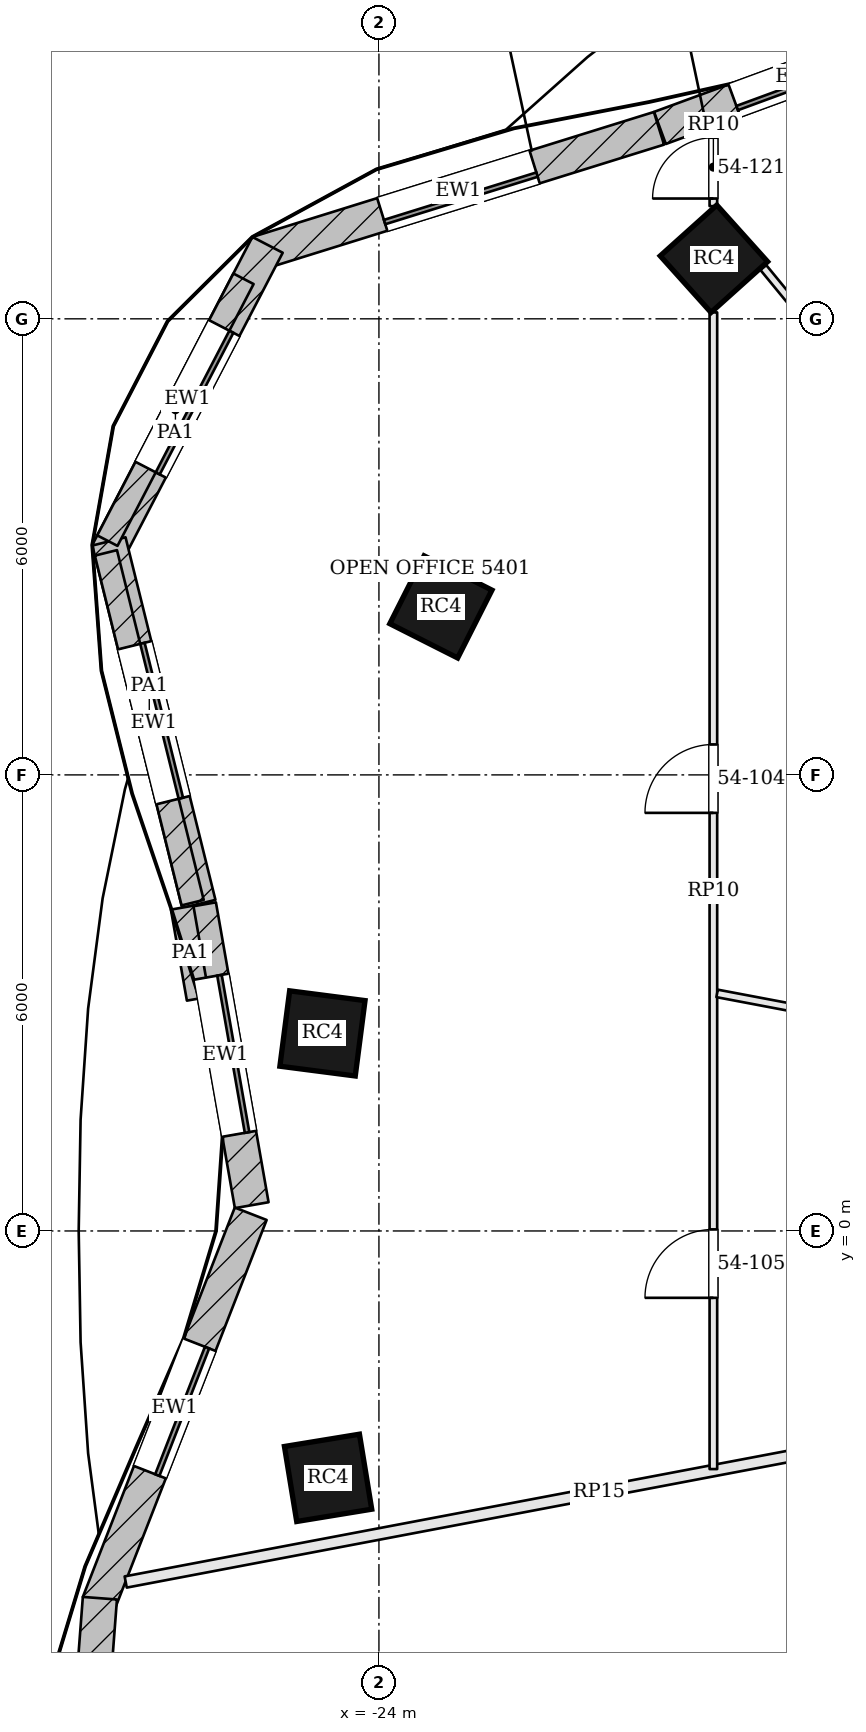
"""IFC4 building model, lengths in metres.
Left out: names, types, materials, properties, quantities, classifications, styles, units other than length and angle.
Written with IfcOpenShell. Run it as: python <this file> out.ifc"""

import sys

from ifc_helpers import new_model, si_unit, direction, frame, frame_2d, origin, origin_2d, place, context, subcontext, project, spatial, rectangle, extrude, element, fill, save


model = new_model("IFC4")
c1 = context("Model", 3, precision=1e-05, world=origin(), true_north=direction((0.0, 1.0)))
c2 = subcontext(c1, "Body", "Model", "MODEL_VIEW")
j1 = project(units=[si_unit("LENGTHUNIT", "METRE"), si_unit("PLANEANGLEUNIT", "RADIAN")], contexts=[c1])
p1 = place(None, origin())
s1 = spatial("IfcSite", under=j1, at=p1, CompositionType="ELEMENT")
p2 = place(p1, origin())
s2 = spatial("IfcBuilding", under=s1, at=p2, CompositionType="ELEMENT")
p3 = place(p2, frame((0.0, 0.0, 221.4)))
s3 = spatial("IfcBuildingStorey", under=s2, at=p3, CompositionType="ELEMENT", Elevation=221.4)
for number, where, z_axis, x_axis in (
    (1, (-19.593, 12.79, 0.0), (0.0, 0.0, 1.0), (-0.744, -0.668, 0.0)),
    (2, (-23.185, 8.21, 0.0), (0.0, 0.0, 1.0), (-0.451, -0.893, 0.0)),
    (3, (-24.743, 2.599, 0.0), (0.0, 0.0, 1.0), (-0.128, -0.992, 0.0)),
    (4, (-24.669, -3.248, 0.0), (0.0, 0.0, 1.0), (0.162, -0.987, 0.0)),
):
    element("IfcColumn", number, at=place(p3, frame(where, z_axis=z_axis, x_axis=x_axis)), inside=s3, PredefinedType="COLUMN", context=c2, shape_type="SweptSolid", body=[
        extrude(rectangle(XDim=1.0, YDim=1.0, at=origin_2d()), origin(), (0.0, 0.0, 1.0), 3.9),
    ])
p4 = place(p3, frame((-16.654, 15.852, 0.0), z_axis=(0.0, 0.0, 1.0), x_axis=(-0.938636568132, -0.344907803572, 0.0)))
e5 = element("IfcWall", 5, at=p4, inside=s3, PredefinedType="SOLIDWALL", context=c2, shape_type="SweptSolid", body=[
    extrude(rectangle(XDim=3.887, YDim=0.45, at=frame_2d((1.944, 0.0))), origin(), (0.0, 0.0, 1.0), 3.7),
])
p5 = place(p4, frame((1.044, 0.0, 0.9)))
e6 = element("IfcOpeningElement", 6, at=p5, cuts=e5, PredefinedType="OPENING", context=c2, shape_type="SweptSolid", body=[
    extrude(rectangle(XDim=1.8, YDim=2.3, at=frame_2d((0.9, 1.15))), frame((0.0, 0.235, 0.0), z_axis=(0.0, -1.0, 0.0), x_axis=(1.0, 0.0, 0.0)), (0.0, 0.0, 1.0), 0.47),
])
p6 = place(p3, frame((-20.316, 14.507, 0.0), z_axis=(0.0, 0.0, 1.0), x_axis=(-0.954807195185, -0.297225873743, 0.0)))
e7 = element("IfcWall", 7, at=p6, inside=s3, PredefinedType="SOLIDWALL", context=c2, shape_type="SweptSolid", body=[
    extrude(rectangle(XDim=5.526, YDim=0.45, at=frame_2d((2.763, 0.0))), origin(), (0.0, 0.0, 1.0), 3.7),
])
p7 = place(p6, frame((1.713, 0.0, 0.9)))
e8 = element("IfcOpeningElement", 8, at=p7, cuts=e7, PredefinedType="OPENING", context=c2, shape_type="SweptSolid", body=[
    extrude(rectangle(XDim=2.1, YDim=2.3, at=frame_2d((1.05, 1.15))), frame((0.0, 0.235, 0.0), z_axis=(0.0, -1.0, 0.0), x_axis=(1.0, 0.0, 0.0)), (0.0, 0.0, 1.0), 0.47),
])
p8 = place(p3, frame((-25.465, 12.973, 0.0), z_axis=(0.0, 0.0, 1.0), x_axis=(-0.461288789222, -0.887250050965, 0.0)))
e9 = element("IfcWall", 9, at=p8, inside=s3, PredefinedType="SOLIDWALL", context=c2, shape_type="SweptSolid", body=[
    extrude(rectangle(XDim=4.568, YDim=0.45, at=frame_2d((2.284, 0.0))), origin(), (0.0, 0.0, 1.0), 3.7),
])
p9 = place(p8, frame((1.234, 0.0, 0.9)))
e10 = element("IfcOpeningElement", 10, at=p9, cuts=e9, PredefinedType="OPENING", context=c2, shape_type="SweptSolid", body=[
    extrude(rectangle(XDim=2.1, YDim=2.3, at=frame_2d((1.05, 1.15))), frame((0.0, 0.235, 0.0), z_axis=(0.0, -1.0, 0.0), x_axis=(1.0, 0.0, 0.0)), (0.0, 0.0, 1.0), 0.47),
])
p10 = place(p3, frame((-27.552, 9.072, 0.0), z_axis=(0.0, 0.0, 1.0), x_axis=(0.240629941406, -0.970616933347, 0.0)))
e11 = element("IfcWall", 11, at=p10, inside=s3, PredefinedType="SOLIDWALL", context=c2, shape_type="SweptSolid", body=[
    extrude(rectangle(XDim=4.915, YDim=0.45, at=frame_2d((2.457, 0.0))), origin(), (0.0, 0.0, 1.0), 3.7),
])
p11 = place(p10, frame((1.407, 0.0, 0.9)))
e12 = element("IfcOpeningElement", 12, at=p11, cuts=e11, PredefinedType="OPENING", context=c2, shape_type="SweptSolid", body=[
    extrude(rectangle(XDim=2.1, YDim=2.3, at=frame_2d((1.05, 1.15))), frame((0.0, 0.235, 0.0), z_axis=(0.0, -1.0, 0.0), x_axis=(1.0, 0.0, 0.0)), (0.0, 0.0, 1.0), 0.47),
])
p12 = place(p3, frame((-26.366, 4.285, 0.0), z_axis=(0.0, 0.0, 1.0), x_axis=(0.172902168926, -0.984939003178, 0.0)))
e13 = element("IfcWall", 13, at=p12, inside=s3, PredefinedType="SOLIDWALL", context=c2, shape_type="SweptSolid", body=[
    extrude(rectangle(XDim=4.006, YDim=0.45, at=frame_2d((2.003, 0.0))), origin(), (0.0, 0.0, 1.0), 3.7),
])
p13 = place(p12, frame((0.953, 0.0, 0.9)))
e14 = element("IfcOpeningElement", 14, at=p13, cuts=e13, PredefinedType="OPENING", context=c2, shape_type="SweptSolid", body=[
    extrude(rectangle(XDim=2.1, YDim=2.3, at=frame_2d((1.05, 1.15))), frame((0.0, 0.235, 0.0), z_axis=(0.0, -1.0, 0.0), x_axis=(1.0, 0.0, 0.0)), (0.0, 0.0, 1.0), 0.47),
])
p14 = place(p3, frame((-25.687, 0.226, 0.0), z_axis=(0.0, 0.0, 1.0), x_axis=(-0.363500194409, -0.931594122279, 0.0)))
e15 = element("IfcWall", 15, at=p14, inside=s3, PredefinedType="SOLIDWALL", context=c2, shape_type="SweptSolid", body=[
    extrude(rectangle(XDim=5.499, YDim=0.45, at=frame_2d((2.75, 0.0))), origin(), (0.0, 0.0, 1.0), 3.7),
])
p15 = place(p14, frame((1.849, 0.0, 0.9)))
e16 = element("IfcOpeningElement", 16, at=p15, cuts=e15, PredefinedType="OPENING", context=c2, shape_type="SweptSolid", body=[
    extrude(rectangle(XDim=1.8, YDim=2.3, at=frame_2d((0.9, 1.15))), frame((0.0, 0.235, 0.0), z_axis=(0.0, -1.0, 0.0), x_axis=(1.0, 0.0, 0.0)), (0.0, 0.0, 1.0), 0.47),
])
p16 = place(p3, frame((-27.671, -4.831, 0.0), z_axis=(0.0, 0.0, 1.0), x_axis=(-0.075658122047, -0.997133816781, 0.0)))
e17 = element("IfcWall", 17, at=p16, inside=s3, PredefinedType="SOLIDWALL", context=c2, shape_type="SweptSolid", body=[
    extrude(rectangle(XDim=4.369, YDim=0.45, at=frame_2d((2.185, 0.0))), origin(), (0.0, 0.0, 1.0), 3.7),
])
p17 = place(p16, frame((1.135, 0.0, 0.9)))
e18 = element("IfcOpeningElement", 18, at=p17, cuts=e17, PredefinedType="OPENING", context=c2, shape_type="SweptSolid", body=[
    extrude(rectangle(XDim=2.1, YDim=2.3, at=frame_2d((1.05, 1.15))), frame((0.0, 0.235, 0.0), z_axis=(0.0, -1.0, 0.0), x_axis=(1.0, 0.0, 0.0)), (0.0, 0.0, 1.0), 0.47),
])
p18 = place(p3, frame((-25.782, 12.527, 3.9), z_axis=(0.0, 0.0, 1.0), x_axis=(-0.461218103562, -0.88728679746, 0.0)))
e19 = element("IfcWall", 19, at=p18, inside=s3, PredefinedType="PARAPET", context=c2, shape_type="SweptSolid", body=[
    extrude(rectangle(XDim=3.883, YDim=0.3, at=frame_2d((1.941, 0.0))), origin(), (0.0, 0.0, 1.0), 1.1),
])
p19 = place(p3, frame((-27.592, 8.921, 3.9), z_axis=(0.0, 0.0, 1.0), x_axis=(0.240669381496, -0.970607154729, 0.0)))
e20 = element("IfcWall", 20, at=p19, inside=s3, PredefinedType="PARAPET", context=c2, shape_type="SweptSolid", body=[
    extrude(rectangle(XDim=4.741, YDim=0.3, at=frame_2d((2.371, 0.0))), origin(), (0.0, 0.0, 1.0), 1.1),
])
p20 = place(p3, frame((-26.589, 4.254, 3.9), z_axis=(0.0, 0.0, 1.0), x_axis=(0.172857566704, -0.984946831881, 0.0)))
e21 = element("IfcWall", 21, at=p20, inside=s3, PredefinedType="PARAPET", context=c2, shape_type="SweptSolid", body=[
    extrude(rectangle(XDim=1.216, YDim=0.3, at=frame_2d((0.608, 0.0))), origin(), (0.0, 0.0, 1.0), 1.1),
])
p21 = place(p3, frame((-27.332, -4.618, 0.0), z_axis=(0.0, 0.0, 1.0), x_axis=(0.982506027703, 0.186230785661, 0.0)))
e22 = element("IfcWall", 22, at=p21, inside=s3, PredefinedType="PARTITIONING", context=c2, shape_type="SweptSolid", body=[
    extrude(rectangle(XDim=12.68, YDim=0.15, at=frame_2d((6.34, 0.0))), origin(), (0.0, 0.0, 1.0), 3.234),
])
p22 = place(p3, frame((-19.6, -3.133, 0.0), z_axis=(0.0, 0.0, 1.0), x_axis=(0.0, 1.0, 0.0)))
e23 = element("IfcWall", 23, at=p22, inside=s3, PredefinedType="PARTITIONING", context=c2, shape_type="SweptSolid", body=[
    extrude(rectangle(XDim=15.217, YDim=0.1, at=frame_2d((7.609, 0.0))), origin(), (0.0, 0.0, 1.0), 3.084),
])
p23 = place(p22, frame((8.633, 0.0, 0.0)))
e24 = element("IfcOpeningElement", 24, at=p23, cuts=e23, PredefinedType="OPENING", context=c2, shape_type="SweptSolid", body=[
    extrude(rectangle(XDim=0.9, YDim=2.1, at=frame_2d((0.45, 1.05))), frame((0.0, 0.06, 0.0), z_axis=(0.0, -1.0, 0.0), x_axis=(1.0, 0.0, 0.0)), (0.0, 0.0, 1.0), 0.12),
])
p24 = place(p22, frame((2.253, 0.0, 0.0)))
e25 = element("IfcOpeningElement", 25, at=p24, cuts=e23, PredefinedType="OPENING", context=c2, shape_type="SweptSolid", body=[
    extrude(rectangle(XDim=0.9, YDim=2.1, at=frame_2d((0.45, 1.05))), frame((0.0, 0.06, 0.0), z_axis=(0.0, -1.0, 0.0), x_axis=(1.0, 0.0, 0.0)), (0.0, 0.0, 1.0), 0.12),
])
p25 = place(p3, frame((-19.6, 13.483, 0.0), z_axis=(0.0, 0.0, 1.0), x_axis=(0.0, 1.0, 0.0)))
e26 = element("IfcWall", 26, at=p25, inside=s3, PredefinedType="PARTITIONING", context=c2, shape_type="SweptSolid", body=[
    extrude(rectangle(XDim=1.026, YDim=0.1, at=frame_2d((0.513, 0.0))), origin(), (0.0, 0.0, 1.0), 3.084),
])
p26 = place(p25, frame((0.1, 0.0, 0.0)))
e27 = element("IfcOpeningElement", 27, at=p26, cuts=e26, PredefinedType="OPENING", context=c2, shape_type="SweptSolid", body=[
    extrude(rectangle(XDim=0.8, YDim=2.1, at=frame_2d((0.4, 1.05))), frame((0.0, 0.06, 0.0), z_axis=(0.0, -1.0, 0.0), x_axis=(1.0, 0.0, 0.0)), (0.0, 0.0, 1.0), 0.12),
])
p27 = place(p3, frame((-14.848, 7.689, 0.0), z_axis=(0.0, 0.0, 1.0), x_axis=(-0.63471602348, 0.772745475262, 0.0)))
e28 = element("IfcWall", 28, at=p27, inside=s3, PredefinedType="PARTITIONING", context=c2, shape_type="SweptSolid", body=[
    extrude(rectangle(XDim=6.452, YDim=0.1, at=frame_2d((3.226, 0.0))), origin(), (0.0, 0.0, 1.0), 3.084),
])
p28 = place(p3, frame((-14.874, 2.239, 0.0), z_axis=(0.0, 0.0, 1.0), x_axis=(-0.982526163868, 0.186124520994, 0.0)))
e29 = element("IfcWall", 29, at=p28, inside=s3, PredefinedType="PARTITIONING", context=c2, shape_type="SweptSolid", body=[
    extrude(rectangle(XDim=4.76, YDim=0.1, at=frame_2d((2.38, 0.0))), origin(), (0.0, 0.0, 1.0), 3.084),
])
p29 = place(p5, origin())
e30 = element("IfcWindow", 30, at=p29, inside=s3, PartitioningType="SINGLE_PANEL", PredefinedType="WINDOW", context=c2, shape_type="SweptSolid", body=[
    extrude(rectangle(XDim=1.8, YDim=2.3, at=frame_2d((0.9, 1.15))), frame((0.0, 0.135, 0.0), z_axis=(0.0, -1.0, 0.0), x_axis=(1.0, 0.0, 0.0)), (0.0, 0.0, 1.0), 0.06),
])
fill(e6, e30)
p30 = place(p7, origin())
e31 = element("IfcWindow", 31, at=p30, inside=s3, PartitioningType="SINGLE_PANEL", PredefinedType="WINDOW", context=c2, shape_type="SweptSolid", body=[
    extrude(rectangle(XDim=2.1, YDim=2.3, at=frame_2d((1.05, 1.15))), frame((0.0, 0.135, 0.0), z_axis=(0.0, -1.0, 0.0), x_axis=(1.0, 0.0, 0.0)), (0.0, 0.0, 1.0), 0.06),
])
fill(e8, e31)
p31 = place(p9, origin())
e32 = element("IfcWindow", 32, at=p31, inside=s3, PartitioningType="SINGLE_PANEL", PredefinedType="WINDOW", context=c2, shape_type="SweptSolid", body=[
    extrude(rectangle(XDim=2.1, YDim=2.3, at=frame_2d((1.05, 1.15))), frame((0.0, 0.135, 0.0), z_axis=(0.0, -1.0, 0.0), x_axis=(1.0, 0.0, 0.0)), (0.0, 0.0, 1.0), 0.06),
])
fill(e10, e32)
p32 = place(p11, origin())
e33 = element("IfcWindow", 33, at=p32, inside=s3, PartitioningType="SINGLE_PANEL", PredefinedType="WINDOW", context=c2, shape_type="SweptSolid", body=[
    extrude(rectangle(XDim=2.1, YDim=2.3, at=frame_2d((1.05, 1.15))), frame((0.0, 0.135, 0.0), z_axis=(0.0, -1.0, 0.0), x_axis=(1.0, 0.0, 0.0)), (0.0, 0.0, 1.0), 0.06),
])
fill(e12, e33)
p33 = place(p13, origin())
e34 = element("IfcWindow", 34, at=p33, inside=s3, PartitioningType="SINGLE_PANEL", PredefinedType="WINDOW", context=c2, shape_type="SweptSolid", body=[
    extrude(rectangle(XDim=2.1, YDim=2.3, at=frame_2d((1.05, 1.15))), frame((0.0, 0.135, 0.0), z_axis=(0.0, -1.0, 0.0), x_axis=(1.0, 0.0, 0.0)), (0.0, 0.0, 1.0), 0.06),
])
fill(e14, e34)
p34 = place(p15, origin())
e35 = element("IfcWindow", 35, at=p34, inside=s3, PartitioningType="SINGLE_PANEL", PredefinedType="WINDOW", context=c2, shape_type="SweptSolid", body=[
    extrude(rectangle(XDim=1.8, YDim=2.3, at=frame_2d((0.9, 1.15))), frame((0.0, 0.135, 0.0), z_axis=(0.0, -1.0, 0.0), x_axis=(1.0, 0.0, 0.0)), (0.0, 0.0, 1.0), 0.06),
])
fill(e16, e35)
p35 = place(p23, origin())
e36 = element("IfcDoor", 36, at=p35, inside=s3, OperationType="SINGLE_SWING_LEFT", PredefinedType="DOOR", context=c2, shape_type="SweptSolid", body=[
    extrude(rectangle(XDim=0.9, YDim=2.1, at=frame_2d((0.45, 1.05))), frame((0.0, 0.025, 0.0), z_axis=(0.0, -1.0, 0.0), x_axis=(1.0, 0.0, 0.0)), (0.0, 0.0, 1.0), 0.05),
])
fill(e24, e36)
p36 = place(p24, origin())
e37 = element("IfcDoor", 37, at=p36, inside=s3, OperationType="SINGLE_SWING_LEFT", PredefinedType="DOOR", context=c2, shape_type="SweptSolid", body=[
    extrude(rectangle(XDim=0.9, YDim=2.1, at=frame_2d((0.45, 1.05))), frame((0.0, 0.025, 0.0), z_axis=(0.0, -1.0, 0.0), x_axis=(1.0, 0.0, 0.0)), (0.0, 0.0, 1.0), 0.05),
])
fill(e25, e37)
p37 = place(p26, origin())
e38 = element("IfcDoor", 38, at=p37, inside=s3, OperationType="SINGLE_SWING_LEFT", PredefinedType="DOOR", context=c2, shape_type="SweptSolid", body=[
    extrude(rectangle(XDim=0.8, YDim=2.1, at=frame_2d((0.4, 1.05))), frame((0.0, 0.025, 0.0), z_axis=(0.0, -1.0, 0.0), x_axis=(1.0, 0.0, 0.0)), (0.0, 0.0, 1.0), 0.05),
])
fill(e27, e38)
save(model, sys.argv[1])
